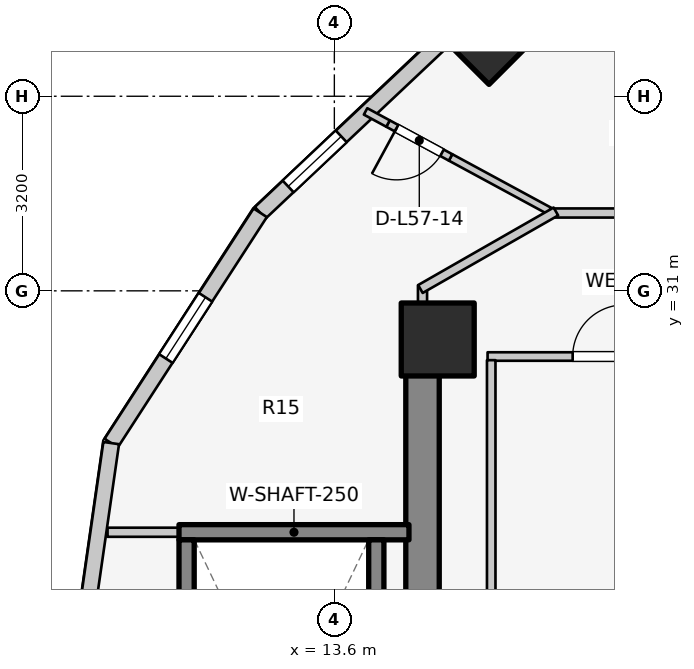
"""IFC4 building model, lengths in metres.
Left out: names, types, materials, properties, quantities, classifications, styles, units other than length and angle.
Written with IfcOpenShell. Run it as: python <this file> out.ifc"""

import sys

from ifc_helpers import new_model, si_unit, direction, frame, frame_2d, origin, origin_2d, place, context, subcontext, project, spatial, rectangle, extrude, element, fill, save


model = new_model("IFC4")
c1 = context("Model", 3, precision=1e-05, world=origin(), true_north=direction((0.0, 1.0)))
c2 = subcontext(c1, "Body", "Model", "MODEL_VIEW")
j1 = project(units=[si_unit("LENGTHUNIT", "METRE"), si_unit("PLANEANGLEUNIT", "RADIAN")], contexts=[c1])
p1 = place(None, origin())
s1 = spatial("IfcSite", under=j1, at=p1, CompositionType="ELEMENT")
p2 = place(p1, origin())
s2 = spatial("IfcBuilding", under=s1, at=p2, CompositionType="ELEMENT")
p3 = place(p2, frame((0.0, 0.0, 187.0)))
s3 = spatial("IfcBuildingStorey", under=s2, at=p3, CompositionType="ELEMENT", Elevation=187.0)
p4 = place(p3, frame((15.05, 17.05, 0.0), z_axis=(0.0, 0.0, 1.0), x_axis=(0.0, 1.0, 0.0)))
e1 = element("IfcWall", 1, at=p4, inside=s3, PredefinedType="SHEAR", context=c2, shape_type="SweptSolid", body=[
    extrude(rectangle(XDim=12.8, YDim=0.55, at=frame_2d((6.4, 0.0))), origin(), (0.0, 0.0, 1.0), 3.1),
])
p5 = place(p3, frame((11.045, 27.03, 0.0), z_axis=(0.0, 0.0, 1.0), x_axis=(1.0, 0.0, 0.0)))
e2 = element("IfcWall", 2, at=p5, inside=s3, PredefinedType="SOLIDWALL", context=c2, shape_type="SweptSolid", body=[
    extrude(rectangle(XDim=3.782, YDim=0.25, at=frame_2d((1.891, 0.0))), origin(), (0.0, 0.0, 1.0), 3.1),
])
for number, where, z_axis, x_axis in (
    (3, (11.17, 19.095, 0.0), (0.0, 0.0, 1.0), (0.0, 1.0, 0.0)),
    (4, (14.29, 19.095, 0.0), (0.0, 0.0, 1.0), (0.0, 1.0, 0.0)),
):
    element("IfcWall", number, at=place(p3, frame(where, z_axis=z_axis, x_axis=x_axis)), inside=s3, PredefinedType="SOLIDWALL", context=c2, shape_type="SweptSolid", body=[
        extrude(rectangle(XDim=7.81, YDim=0.25, at=frame_2d((3.905, 0.0))), origin(), (0.0, 0.0, 1.0), 3.1),
    ])
p6 = place(p3, frame((15.3, 30.2, 0.0), z_axis=(0.0, 0.0, 1.0), x_axis=(1.0, 0.0, 0.0)))
e5 = element("IfcColumn", 5, at=p6, inside=s3, PredefinedType="COLUMN", context=c2, shape_type="SweptSolid", body=[
    extrude(rectangle(XDim=1.2, YDim=1.2, at=origin_2d()), origin(), (0.0, 0.0, 1.0), 3.1),
])
p7 = place(p3, frame((16.143, 35.031, 0.0), z_axis=(0.0, 0.0, 1.0), x_axis=(-0.707106781187, 0.707106781187, 0.0)))
e6 = element("IfcColumn", 6, at=p7, inside=s3, PredefinedType="COLUMN", context=c2, shape_type="SweptSolid", body=[
    extrude(rectangle(XDim=0.9, YDim=0.9, at=origin_2d()), origin(), (0.0, 0.0, 1.0), 3.1),
])
p8 = place(p3, frame((15.731, 35.441, 0.0), z_axis=(0.0, 0.0, 1.0), x_axis=(-0.727667301037, -0.68593024354, 0.0)))
e7 = element("IfcWall", 7, at=p8, inside=s3, PredefinedType="STANDARD", context=c2, shape_type="SweptSolid", body=[
    extrude(rectangle(XDim=4.604, YDim=0.26, at=frame_2d((2.302, 0.0))), origin(), (0.0, 0.0, 1.0), 1.22),
])
p9 = place(p8, frame((2.772, 0.0, 0.15)))
e8 = element("IfcOpeningElement", 8, at=p9, cuts=e7, PredefinedType="OPENING", context=c2, shape_type="SweptSolid", body=[
    extrude(rectangle(XDim=1.2, YDim=0.9, at=frame_2d((0.6, 0.45))), frame((0.0, 0.14, 0.0), z_axis=(0.0, -1.0, 0.0), x_axis=(1.0, 0.0, 0.0)), (0.0, 0.0, 1.0), 0.28),
])
p10 = place(p3, frame((12.381, 32.284, 0.0), z_axis=(0.0, 0.0, 1.0), x_axis=(-0.543358984534, -0.839500454989, 0.0)))
e9 = element("IfcWall", 9, at=p10, inside=s3, PredefinedType="STANDARD", context=c2, shape_type="SweptSolid", body=[
    extrude(rectangle(XDim=4.511, YDim=0.26, at=frame_2d((2.256, 0.0))), origin(), (0.0, 0.0, 1.0), 1.22),
])
p11 = place(p10, frame((1.656, 0.0, 0.15)))
e10 = element("IfcOpeningElement", 10, at=p11, cuts=e9, PredefinedType="OPENING", context=c2, shape_type="SweptSolid", body=[
    extrude(rectangle(XDim=1.2, YDim=0.9, at=frame_2d((0.6, 0.45))), frame((0.0, 0.14, 0.0), z_axis=(0.0, -1.0, 0.0), x_axis=(1.0, 0.0, 0.0)), (0.0, 0.0, 1.0), 0.28),
])
p12 = place(p3, frame((9.93, 28.497, 0.0), z_axis=(0.0, 0.0, 1.0), x_axis=(-0.142227632286, -0.989833976288, 0.0)))
e11 = element("IfcWall", 11, at=p12, inside=s3, PredefinedType="STANDARD", context=c2, shape_type="SweptSolid", body=[
    extrude(rectangle(XDim=5.553, YDim=0.26, at=frame_2d((2.776, 0.0))), origin(), (0.0, 0.0, 1.0), 2.57),
])
p13 = place(p12, frame((2.892, 0.0, 0.75)))
e12 = element("IfcOpeningElement", 12, at=p13, cuts=e11, PredefinedType="OPENING", context=c2, shape_type="SweptSolid", body=[
    extrude(rectangle(XDim=1.2, YDim=1.5, at=frame_2d((0.6, 0.75))), frame((0.0, 0.14, 0.0), z_axis=(0.0, -1.0, 0.0), x_axis=(1.0, 0.0, 0.0)), (0.0, 0.0, 1.0), 0.28),
])
p14 = place(p3, frame((16.12, 29.92, 0.0), z_axis=(0.0, 0.0, 1.0), x_axis=(1.0, 0.0, 0.0)))
e13 = element("IfcWall", 13, at=p14, inside=s3, PredefinedType="PLUMBINGWALL", context=c2, shape_type="SweptSolid", body=[
    extrude(rectangle(XDim=3.3, YDim=0.14, at=frame_2d((1.65, 0.0))), origin(), (0.0, 0.0, 1.0), 2.575),
])
p15 = place(p14, frame((1.399, 0.0, 0.0)))
e14 = element("IfcOpeningElement", 14, at=p15, cuts=e13, PredefinedType="OPENING", context=c2, shape_type="SweptSolid", body=[
    extrude(rectangle(XDim=0.85, YDim=2.05, at=frame_2d((0.425, 1.025))), frame((0.0, 0.08, 0.0), z_axis=(0.0, -1.0, 0.0), x_axis=(1.0, 0.0, 0.0)), (0.0, 0.0, 1.0), 0.16),
])
p16 = place(p3, frame((16.18, 25.98, 0.0), z_axis=(0.0, 0.0, 1.0), x_axis=(0.0, 1.0, 0.0)))
e15 = element("IfcWall", 15, at=p16, inside=s3, PredefinedType="PLUMBINGWALL", context=c2, shape_type="SweptSolid", body=[
    extrude(rectangle(XDim=3.88, YDim=0.14, at=frame_2d((1.94, 0.0))), origin(), (0.0, 0.0, 1.0), 2.575),
])
p17 = place(p3, frame((9.87, 27.03, 0.0), z_axis=(0.0, 0.0, 1.0), x_axis=(1.0, 0.0, 0.0)))
e16 = element("IfcWall", 16, at=p17, inside=s3, PredefinedType="PARTITIONING", context=c2, shape_type="SweptSolid", body=[
    extrude(rectangle(XDim=1.17, YDim=0.15, at=frame_2d((0.585, 0.0))), origin(), (0.0, 0.0, 1.0), 2.575),
])
p18 = place(p3, frame((15.05, 29.8, 0.0), z_axis=(0.0, 0.0, 1.0), x_axis=(0.0, 1.0, 0.0)))
e17 = element("IfcWall", 17, at=p18, inside=s3, PredefinedType="PARTITIONING", context=c2, shape_type="SweptSolid", body=[
    extrude(rectangle(XDim=1.29, YDim=0.15, at=frame_2d((0.645, 0.0))), origin(), (0.0, 0.0, 1.0), 1.22),
])
p19 = place(p3, frame((17.244, 32.256, 0.0), z_axis=(0.0, 0.0, 1.0), x_axis=(-0.879406539295, 0.476071568828, 0.0)))
e18 = element("IfcWall", 18, at=p19, inside=s3, PredefinedType="MOVABLE", context=c2, shape_type="SweptSolid", body=[
    extrude(rectangle(XDim=1.97, YDim=0.12, at=frame_2d((0.985, 0.0))), origin(), (0.0, 0.0, 1.0), 1.22),
])
p20 = place(p3, frame((15.511, 33.194, 0.0), z_axis=(0.0, 0.0, 1.0), x_axis=(-0.879342939039, 0.476189033433, 0.0)))
e19 = element("IfcWall", 19, at=p20, inside=s3, PredefinedType="MOVABLE", context=c2, shape_type="SweptSolid", body=[
    extrude(rectangle(XDim=1.17, YDim=0.12, at=frame_2d((0.585, 0.0))), origin(), (0.0, 0.0, 1.0), 2.11),
])
p21 = place(p20, frame((0.16, 0.0, 0.0)))
e20 = element("IfcOpeningElement", 20, at=p21, cuts=e19, PredefinedType="OPENING", context=c2, shape_type="SweptSolid", body=[
    extrude(rectangle(XDim=0.85, YDim=2.05, at=frame_2d((0.425, 1.025))), frame((0.0, 0.07, 0.0), z_axis=(0.0, -1.0, 0.0), x_axis=(1.0, 0.0, 0.0)), (0.0, 0.0, 1.0), 0.14),
])
p22 = place(p3, frame((14.482, 33.751, 0.0), z_axis=(0.0, 0.0, 1.0), x_axis=(-0.879403655312, 0.476076896125, 0.0)))
e21 = element("IfcWall", 21, at=p22, inside=s3, PredefinedType="MOVABLE", context=c2, shape_type="SweptSolid", body=[
    extrude(rectangle(XDim=0.419, YDim=0.12, at=frame_2d((0.21, 0.0))), origin(), (0.0, 0.0, 1.0), 2.575),
])
p23 = place(p3, frame((17.15, 32.28, 0.0), z_axis=(0.0, 0.0, 1.0), x_axis=(1.0, 0.0, 0.0)))
e22 = element("IfcWall", 22, at=p23, inside=s3, PredefinedType="PARTITIONING", context=c2, shape_type="SweptSolid", body=[
    extrude(rectangle(XDim=1.14, YDim=0.15, at=frame_2d((0.57, 0.0))), origin(), (0.0, 0.0, 1.0), 2.575),
])
p24 = place(p3, frame((17.243, 32.305, 0.0), z_axis=(0.0, 0.0, 1.0), x_axis=(-0.867991349648, -0.496579315857, 0.0)))
e23 = element("IfcWall", 23, at=p24, inside=s3, PredefinedType="PARTITIONING", context=c2, shape_type="SweptSolid", body=[
    extrude(rectangle(XDim=2.567, YDim=0.15, at=frame_2d((1.283, 0.0))), origin(), (0.0, 0.0, 1.0), 1.22),
])
p25 = place(p9, origin())
e24 = element("IfcWindow", 24, at=p25, inside=s3, PartitioningType="SINGLE_PANEL", PredefinedType="WINDOW", context=c2, shape_type="SweptSolid", body=[
    extrude(rectangle(XDim=1.2, YDim=0.9, at=frame_2d((0.6, 0.45))), frame((0.0, 0.03, 0.0), z_axis=(0.0, -1.0, 0.0), x_axis=(1.0, 0.0, 0.0)), (0.0, 0.0, 1.0), 0.06),
])
fill(e8, e24)
p26 = place(p11, origin())
e25 = element("IfcWindow", 25, at=p26, inside=s3, PartitioningType="SINGLE_PANEL", PredefinedType="WINDOW", context=c2, shape_type="SweptSolid", body=[
    extrude(rectangle(XDim=1.2, YDim=0.9, at=frame_2d((0.6, 0.45))), frame((0.0, 0.03, 0.0), z_axis=(0.0, -1.0, 0.0), x_axis=(1.0, 0.0, 0.0)), (0.0, 0.0, 1.0), 0.06),
])
fill(e10, e25)
p27 = place(p15, origin())
e26 = element("IfcDoor", 26, at=p27, inside=s3, OperationType="SINGLE_SWING_RIGHT", PredefinedType="DOOR", context=c2, shape_type="SweptSolid", body=[
    extrude(rectangle(XDim=0.85, YDim=2.05, at=frame_2d((0.425, 1.025))), frame((0.0, 0.025, 0.0), z_axis=(0.0, -1.0, 0.0), x_axis=(1.0, 0.0, 0.0)), (0.0, 0.0, 1.0), 0.05),
])
fill(e14, e26)
p28 = place(p21, origin())
e27 = element("IfcDoor", 27, at=p28, inside=s3, OperationType="SINGLE_SWING_RIGHT", PredefinedType="DOOR", context=c2, shape_type="SweptSolid", body=[
    extrude(rectangle(XDim=0.85, YDim=2.05, at=frame_2d((0.425, 1.025))), frame((0.0, 0.025, 0.0), z_axis=(0.0, -1.0, 0.0), x_axis=(1.0, 0.0, 0.0)), (0.0, 0.0, 1.0), 0.05),
])
fill(e20, e27)
save(model, sys.argv[1])
